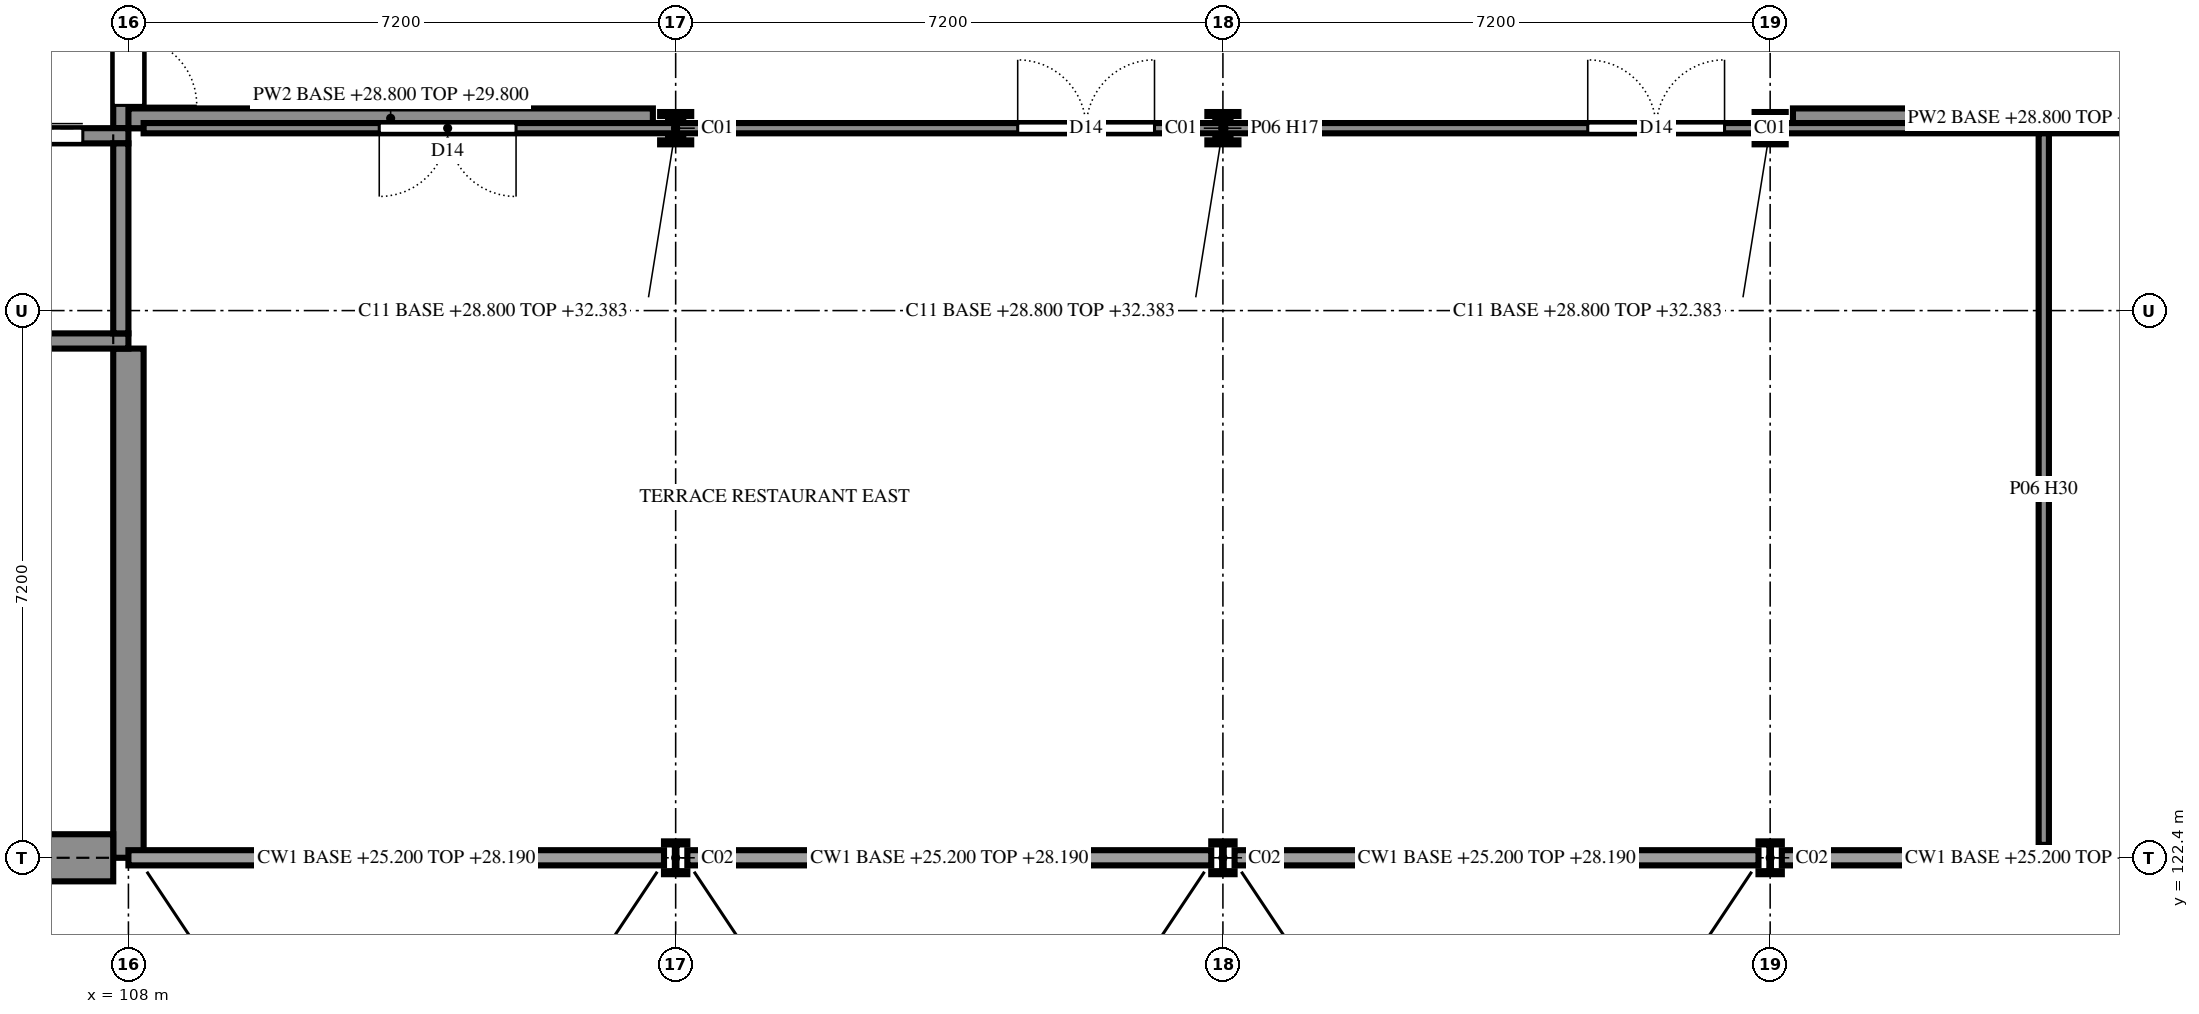
"""IFC4 building model, lengths in metres.
Left out: names, types, materials, properties, quantities, classifications, styles, units other than length and angle.
Written with IfcOpenShell. Run it as: python <this file> out.ifc"""

import sys

from ifc_helpers import new_model, si_unit, direction, frame, frame_2d, origin, origin_2d, place, context, subcontext, project, spatial, rectangle, i_section, extrude, element, fill, save


model = new_model("IFC4")
c1 = context("Model", 3, precision=1e-05, world=origin(), true_north=direction((0.0, 1.0)))
c2 = subcontext(c1, "Body", "Model", "MODEL_VIEW")
j1 = project(units=[si_unit("LENGTHUNIT", "METRE"), si_unit("PLANEANGLEUNIT", "RADIAN")], contexts=[c1])
p1 = place(None, origin())
s1 = spatial("IfcSite", under=j1, at=p1, CompositionType="ELEMENT")
p2 = place(p1, origin())
s2 = spatial("IfcBuilding", under=s1, at=p2, CompositionType="ELEMENT")
p3 = place(p2, frame((0.0, 0.0, 25.2)))
s3 = spatial("IfcBuildingStorey", under=s2, at=p3, CompositionType="ELEMENT", Elevation=25.2)
p4 = place(p3, frame((115.2, 122.4, 0.0), z_axis=(0.0, 0.0, 1.0), x_axis=(1.0, 0.0, 0.0)))
e1 = element("IfcColumn", 1, at=p4, inside=s3, PredefinedType="COLUMN", context=c2, shape_type="SweptSolid", body=[
    extrude(i_section(OverallWidth=0.307, OverallDepth=0.432, WebThickness=0.021, FlangeThickness=0.04, FilletRadius=0.027, at=origin_2d()), origin(), (0.0, 0.0, 1.0), 3.6),
])
p5 = place(p3, frame((115.2, 132.0, 0.0), z_axis=(0.0, 0.0, 1.0), x_axis=(1.0, 0.0, 0.0)))
e2 = element("IfcColumn", 2, at=p5, inside=s3, PredefinedType="COLUMN", context=c2, shape_type="SweptSolid", body=[
    extrude(i_section(OverallWidth=0.409, OverallDepth=0.425, WebThickness=0.033, FlangeThickness=0.052, FilletRadius=0.015, at=origin_2d()), origin(), (0.0, 0.0, 1.0), 3.6),
])
p6 = place(p3, frame((122.4, 122.4, 0.0), z_axis=(0.0, 0.0, 1.0), x_axis=(1.0, 0.0, 0.0)))
e3 = element("IfcColumn", 3, at=p6, inside=s3, PredefinedType="COLUMN", context=c2, shape_type="SweptSolid", body=[
    extrude(i_section(OverallWidth=0.307, OverallDepth=0.432, WebThickness=0.021, FlangeThickness=0.04, FilletRadius=0.027, at=origin_2d()), origin(), (0.0, 0.0, 1.0), 3.6),
])
p7 = place(p3, frame((122.4, 132.0, 0.0), z_axis=(0.0, 0.0, 1.0), x_axis=(1.0, 0.0, 0.0)))
e4 = element("IfcColumn", 4, at=p7, inside=s3, PredefinedType="COLUMN", context=c2, shape_type="SweptSolid", body=[
    extrude(i_section(OverallWidth=0.409, OverallDepth=0.425, WebThickness=0.033, FlangeThickness=0.052, FilletRadius=0.015, at=origin_2d()), origin(), (0.0, 0.0, 1.0), 3.6),
])
p8 = place(p3, frame((129.6, 122.4, 0.0), z_axis=(0.0, 0.0, 1.0), x_axis=(1.0, 0.0, 0.0)))
e5 = element("IfcColumn", 5, at=p8, inside=s3, PredefinedType="COLUMN", context=c2, shape_type="SweptSolid", body=[
    extrude(i_section(OverallWidth=0.307, OverallDepth=0.432, WebThickness=0.021, FlangeThickness=0.04, FilletRadius=0.027, at=origin_2d()), origin(), (0.0, 0.0, 1.0), 3.6),
])
p9 = place(p3, frame((129.6, 132.0, 0.0), z_axis=(0.0, 0.0, 1.0), x_axis=(1.0, 0.0, 0.0)))
e6 = element("IfcColumn", 6, at=p9, inside=s3, PredefinedType="COLUMN", context=c2, shape_type="SweptSolid", body=[
    extrude(i_section(OverallWidth=0.409, OverallDepth=0.425, WebThickness=0.033, FlangeThickness=0.052, FilletRadius=0.015, at=origin_2d()), origin(), (0.0, 0.0, 1.0), 3.6),
])
p10 = place(p3, frame((108.0, 122.4, 0.0), z_axis=(0.0, 0.0, 1.0), x_axis=(0.0, 1.0, 0.0)))
e7 = element("IfcWall", 7, at=p10, inside=s3, PredefinedType="SHEAR", context=c2, shape_type="SweptSolid", body=[
    extrude(rectangle(XDim=6.7, YDim=0.4, at=frame_2d((3.35, 0.0))), origin(), (0.0, 0.0, 1.0), 3.6),
])
p11 = place(p3, frame((108.0, 132.0, 0.0), z_axis=(0.0, 0.0, 1.0), x_axis=(0.0, 1.0, 0.0)))
e8 = element("IfcWall", 8, at=p11, inside=s3, PredefinedType="SHEAR", context=c2, shape_type="SweptSolid", body=[
    extrude(rectangle(XDim=2.5, YDim=0.4, at=frame_2d((1.25, 0.0))), origin(), (0.0, 0.0, 1.0), 3.6),
])
p12 = place(p11, frame((0.3, 0.0, 0.0)))
e9 = element("IfcOpeningElement", 9, at=p12, cuts=e8, PredefinedType="OPENING", context=c2, shape_type="SweptSolid", body=[
    extrude(rectangle(XDim=1.8, YDim=2.1, at=frame_2d((0.9, 1.05))), frame((0.0, 0.21, 0.0), z_axis=(0.0, -1.0, 0.0), x_axis=(1.0, 0.0, 0.0)), (0.0, 0.0, 1.0), 0.42),
])
p13 = place(p3, frame((106.6, 122.4, 0.0), z_axis=(0.0, 0.0, 1.0), x_axis=(1.0, 0.0, 0.0)))
e10 = element("IfcWall", 10, at=p13, inside=s3, PredefinedType="SOLIDWALL", context=c2, shape_type="SweptSolid", body=[
    extrude(rectangle(XDim=1.2, YDim=0.62, at=frame_2d((0.6, 0.0))), origin(), (0.0, 0.0, 1.0), 3.29),
])
p14 = place(p3, frame((108.0, 132.13, 3.6), z_axis=(0.0, 0.0, 1.0), x_axis=(1.0, 0.0, 0.0)))
e11 = element("IfcWall", 11, at=p14, inside=s3, PredefinedType="PARAPET", context=c2, shape_type="SweptSolid", body=[
    extrude(rectangle(XDim=6.9, YDim=0.26, at=frame_2d((3.45, 0.0))), origin(), (0.0, 0.0, 1.0), 1.0),
])
p15 = place(p3, frame((129.9, 132.13, 3.6), z_axis=(0.0, 0.0, 1.0), x_axis=(1.0, 0.0, 0.0)))
e12 = element("IfcWall", 12, at=p15, inside=s3, PredefinedType="PARAPET", context=c2, shape_type="SweptSolid", body=[
    extrude(rectangle(XDim=6.64, YDim=0.26, at=frame_2d((3.32, 0.0))), origin(), (0.0, 0.0, 1.0), 1.0),
])
for number, where, z_axis, x_axis in (
    (13, (115.2, 132.0, 3.6), (0.0, 0.0, 1.0), (1.0, 0.0, 0.0)),
    (14, (122.4, 132.0, 3.6), (0.0, 0.0, 1.0), (1.0, 0.0, 0.0)),
    (15, (129.6, 132.0, 3.6), (0.0, 0.0, 1.0), (1.0, 0.0, 0.0)),
):
    element("IfcColumn", number, at=place(p3, frame(where, z_axis=z_axis, x_axis=x_axis)), inside=s3, PredefinedType="COLUMN", context=c2, shape_type="SweptSolid", body=[
        extrude(i_section(OverallWidth=0.2, OverallDepth=0.2, WebThickness=0.009, FlangeThickness=0.015, FilletRadius=0.018, at=origin_2d()), origin(), (0.0, 0.0, 1.0), 3.583),
    ])
p16 = place(p3, frame((105.6, 129.2, 0.0), z_axis=(0.0, 0.0, 1.0), x_axis=(1.0, 0.0, 0.0)))
e16 = element("IfcWall", 16, at=p16, inside=s3, PredefinedType="SHEAR", context=c2, shape_type="SweptSolid", body=[
    extrude(rectangle(XDim=2.4, YDim=0.2, at=frame_2d((1.2, 0.0))), origin(), (0.0, 0.0, 1.0), 4.5),
])
p17 = place(p3, frame((105.6, 131.9, 0.0), z_axis=(0.0, 0.0, 1.0), x_axis=(1.0, 0.0, 0.0)))
e17 = element("IfcWall", 17, at=p17, inside=s3, PredefinedType="SHEAR", context=c2, shape_type="SweptSolid", body=[
    extrude(rectangle(XDim=2.4, YDim=0.2, at=frame_2d((1.2, 0.0))), origin(), (0.0, 0.0, 1.0), 4.5),
])
p18 = place(p17, frame((0.6, 0.0, 0.0)))
e18 = element("IfcOpeningElement", 18, at=p18, cuts=e17, PredefinedType="OPENING", context=c2, shape_type="SweptSolid", body=[
    extrude(rectangle(XDim=1.2, YDim=2.1, at=frame_2d((0.6, 1.05))), frame((0.0, 0.11, 0.0), z_axis=(0.0, -1.0, 0.0), x_axis=(1.0, 0.0, 0.0)), (0.0, 0.0, 1.0), 0.22),
])
p19 = place(p3, frame((107.9, 129.3, 0.0), z_axis=(0.0, 0.0, 1.0), x_axis=(0.0, 1.0, 0.0)))
e19 = element("IfcWall", 19, at=p19, inside=s3, PredefinedType="SHEAR", context=c2, shape_type="SweptSolid", body=[
    extrude(rectangle(XDim=2.5, YDim=0.2, at=frame_2d((1.25, 0.0))), origin(), (0.0, 0.0, 1.0), 4.5),
])
p20 = place(p3, frame((108.2, 132.0, 0.0), z_axis=(0.0, 0.0, 1.0), x_axis=(1.0, 0.0, 0.0)))
e20 = element("IfcWall", 20, at=p20, inside=s3, PredefinedType="PARTITIONING", context=c2, shape_type="SweptSolid", body=[
    extrude(rectangle(XDim=28.43, YDim=0.135, at=frame_2d((14.215, 0.0))), origin(), (0.0, 0.0, 1.0), 2.99),
])
p21 = place(p20, frame((26.375, 0.0, 0.0)))
e21 = element("IfcOpeningElement", 21, at=p21, cuts=e20, PredefinedType="OPENING", context=c2, shape_type="SweptSolid", body=[
    extrude(rectangle(XDim=0.85, YDim=2.1, at=frame_2d((0.425, 1.05))), frame((0.0, 0.077, 0.0), z_axis=(0.0, -1.0, 0.0), x_axis=(1.0, 0.0, 0.0)), (0.0, 0.0, 1.0), 0.155),
])
p22 = place(p20, frame((3.1, 0.0, 0.0)))
e22 = element("IfcOpeningElement", 22, at=p22, cuts=e20, PredefinedType="OPENING", context=c2, shape_type="SweptSolid", body=[
    extrude(rectangle(XDim=1.8, YDim=2.1, at=frame_2d((0.9, 1.05))), frame((0.0, 0.077, 0.0), z_axis=(0.0, -1.0, 0.0), x_axis=(1.0, 0.0, 0.0)), (0.0, 0.0, 1.0), 0.155),
])
p23 = place(p20, frame((11.5, 0.0, 0.0)))
e23 = element("IfcOpeningElement", 23, at=p23, cuts=e20, PredefinedType="OPENING", context=c2, shape_type="SweptSolid", body=[
    extrude(rectangle(XDim=1.8, YDim=2.1, at=frame_2d((0.9, 1.05))), frame((0.0, 0.077, 0.0), z_axis=(0.0, -1.0, 0.0), x_axis=(1.0, 0.0, 0.0)), (0.0, 0.0, 1.0), 0.155),
])
p24 = place(p20, frame((19.0, 0.0, 0.0)))
e24 = element("IfcOpeningElement", 24, at=p24, cuts=e20, PredefinedType="OPENING", context=c2, shape_type="SweptSolid", body=[
    extrude(rectangle(XDim=1.8, YDim=2.1, at=frame_2d((0.9, 1.05))), frame((0.0, 0.077, 0.0), z_axis=(0.0, -1.0, 0.0), x_axis=(1.0, 0.0, 0.0)), (0.0, 0.0, 1.0), 0.155),
])
p25 = place(p3, frame((133.2, 122.57, 0.0), z_axis=(0.0, 0.0, 1.0), x_axis=(0.0, 1.0, 0.0)))
e25 = element("IfcWall", 25, at=p25, inside=s3, PredefinedType="PARTITIONING", context=c2, shape_type="SweptSolid", body=[
    extrude(rectangle(XDim=9.363, YDim=0.135, at=frame_2d((4.681, 0.0))), origin(), (0.0, 0.0, 1.0), 2.89),
])
p26 = place(p18, origin())
e26 = element("IfcDoor", 26, at=p26, inside=s3, OperationType="SLIDING_TO_LEFT", PredefinedType="DOOR", context=c2, shape_type="SweptSolid", body=[
    extrude(rectangle(XDim=1.2, YDim=2.1, at=frame_2d((0.6, 1.05))), frame((0.0, 0.025, 0.0), z_axis=(0.0, -1.0, 0.0), x_axis=(1.0, 0.0, 0.0)), (0.0, 0.0, 1.0), 0.05),
])
fill(e18, e26)
p27 = place(p22, frame((1.8, 0.0, 0.0), z_axis=(0.0, 0.0, 1.0), x_axis=(-1.0, 0.0, 0.0)))
e27 = element("IfcDoor", 27, at=p27, inside=s3, OperationType="DOUBLE_DOOR_SINGLE_SWING", PredefinedType="DOOR", context=c2, shape_type="SweptSolid", body=[
    extrude(rectangle(XDim=1.8, YDim=2.1, at=frame_2d((0.9, 1.05))), frame((0.0, 0.025, 0.0), z_axis=(0.0, -1.0, 0.0), x_axis=(1.0, 0.0, 0.0)), (0.0, 0.0, 1.0), 0.05),
])
fill(e22, e27)
p28 = place(p23, origin())
e28 = element("IfcDoor", 28, at=p28, inside=s3, OperationType="DOUBLE_DOOR_SINGLE_SWING", PredefinedType="DOOR", context=c2, shape_type="SweptSolid", body=[
    extrude(rectangle(XDim=1.8, YDim=2.1, at=frame_2d((0.9, 1.05))), frame((0.0, 0.025, 0.0), z_axis=(0.0, -1.0, 0.0), x_axis=(1.0, 0.0, 0.0)), (0.0, 0.0, 1.0), 0.05),
])
fill(e23, e28)
p29 = place(p24, origin())
e29 = element("IfcDoor", 29, at=p29, inside=s3, OperationType="DOUBLE_DOOR_SINGLE_SWING", PredefinedType="DOOR", context=c2, shape_type="SweptSolid", body=[
    extrude(rectangle(XDim=1.8, YDim=2.1, at=frame_2d((0.9, 1.05))), frame((0.0, 0.025, 0.0), z_axis=(0.0, -1.0, 0.0), x_axis=(1.0, 0.0, 0.0)), (0.0, 0.0, 1.0), 0.05),
])
fill(e24, e29)
p30 = place(p12, frame((1.8, 0.0, 0.0), z_axis=(0.0, 0.0, 1.0), x_axis=(-1.0, 0.0, 0.0)))
e30 = element("IfcDoor", 30, at=p30, inside=s3, OperationType="DOUBLE_DOOR_SINGLE_SWING", PredefinedType="DOOR", context=c2, shape_type="SweptSolid", body=[
    extrude(rectangle(XDim=1.8, YDim=2.1, at=frame_2d((0.9, 1.05))), frame((0.0, 0.025, 0.0), z_axis=(0.0, -1.0, 0.0), x_axis=(1.0, 0.0, 0.0)), (0.0, 0.0, 1.0), 0.05),
])
fill(e9, e30)
save(model, sys.argv[1])
